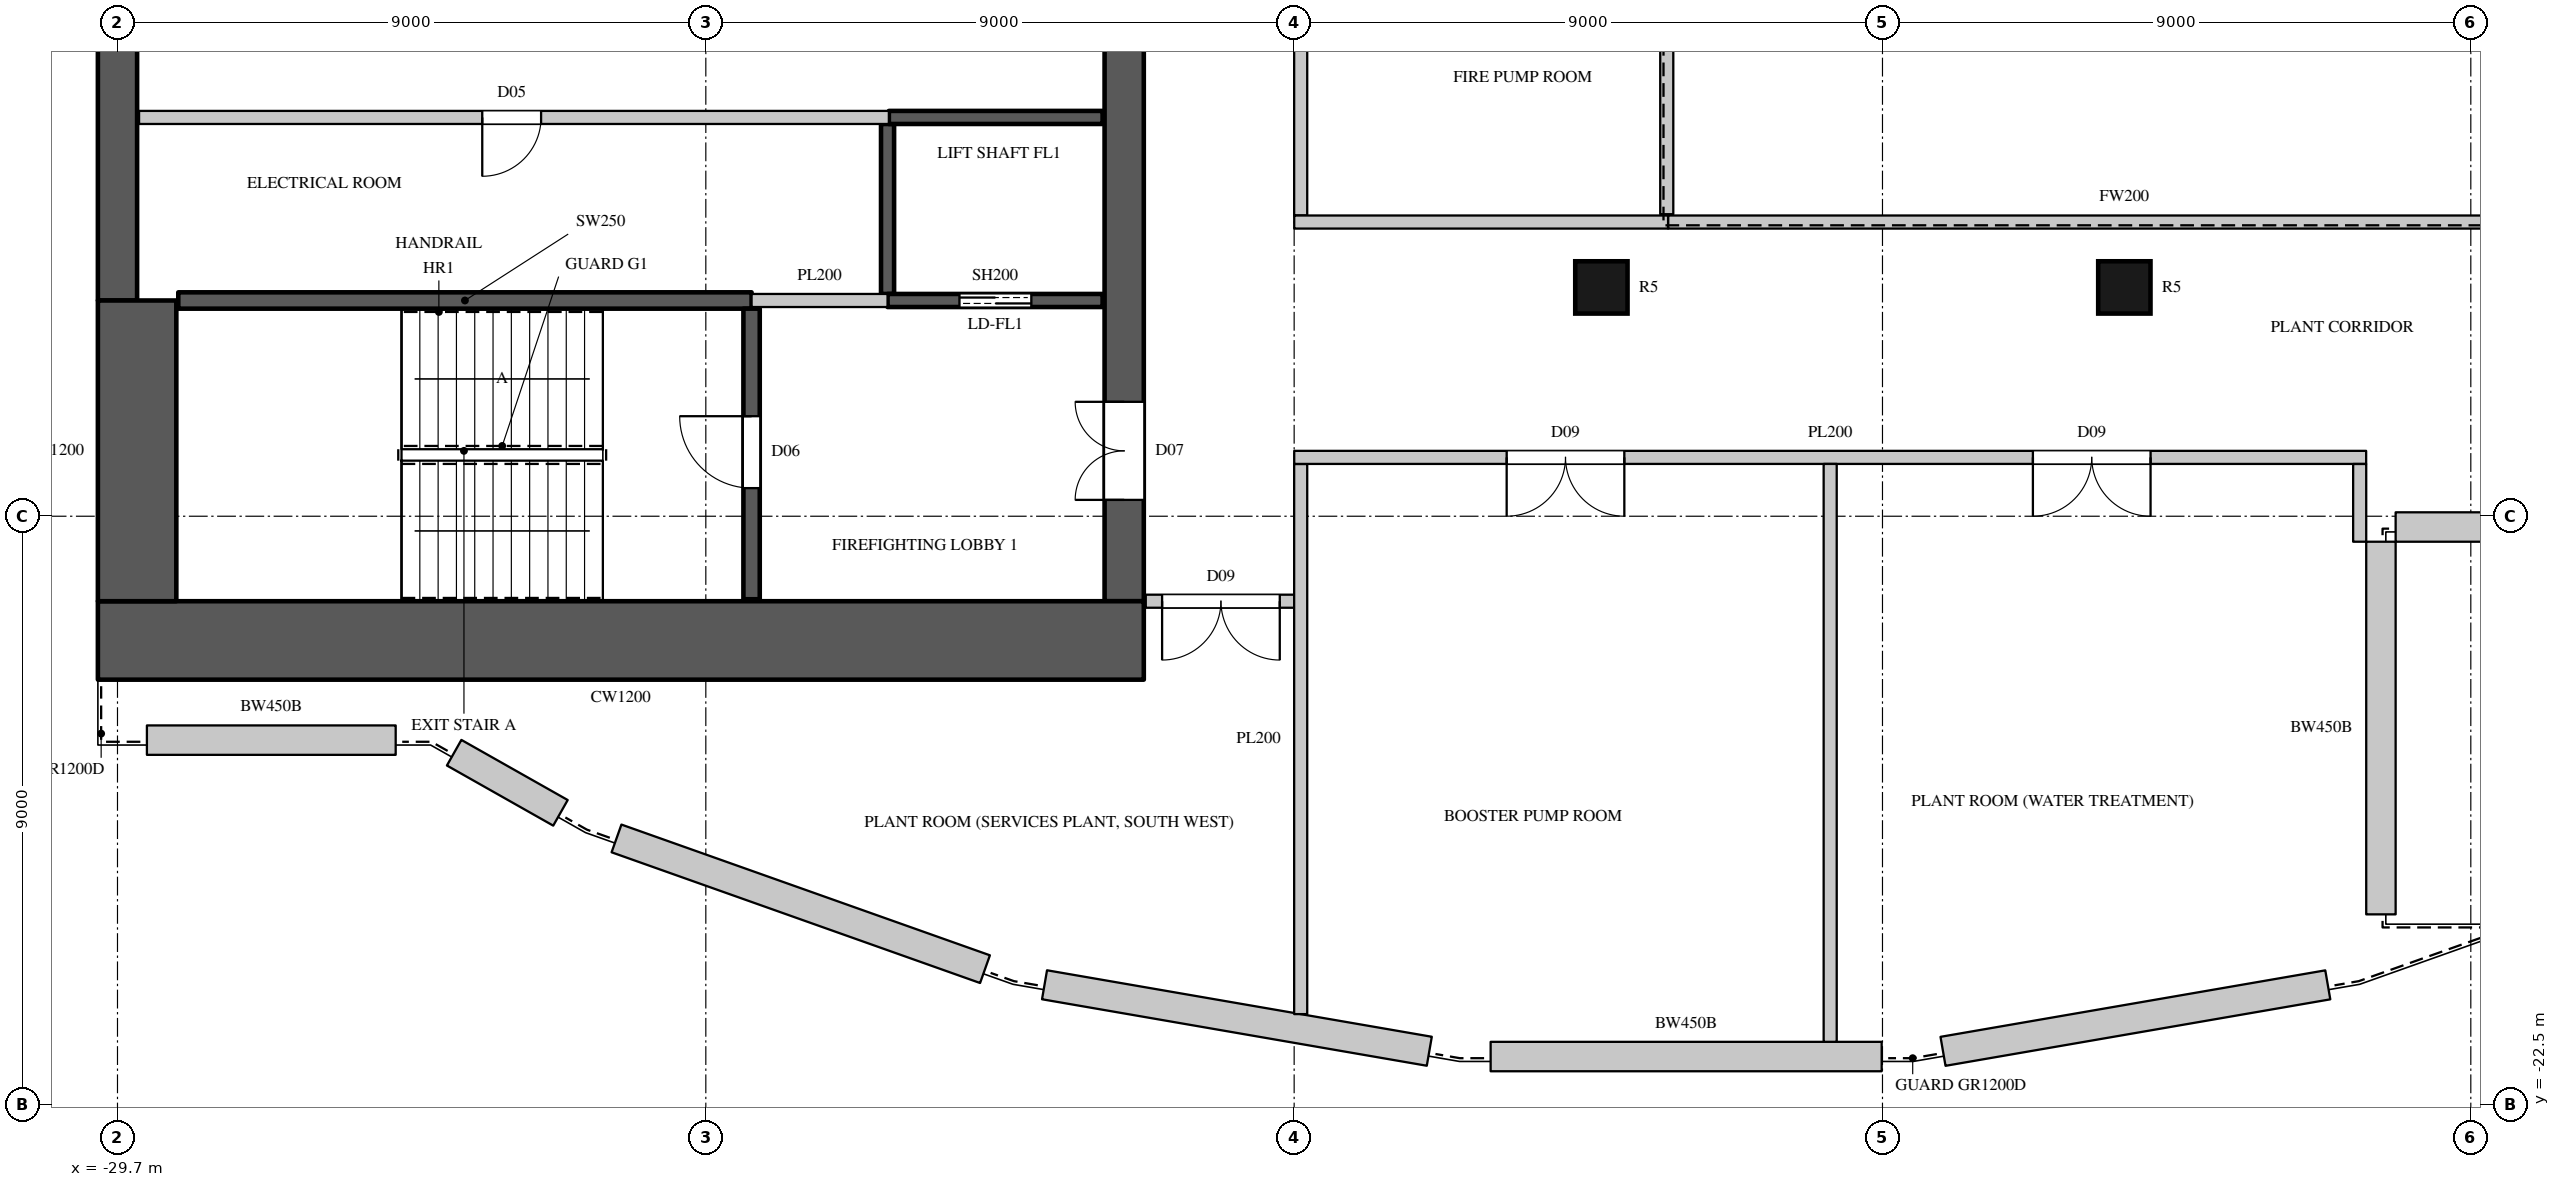
"""IFC4 building model, lengths in metres.
Left out: names, types, materials, properties, quantities, classifications, styles, units other than length and angle.
Written with IfcOpenShell. Run it as: python <this file> out.ifc"""

import sys

from ifc_helpers import new_model, si_unit, direction, frame, frame_2d, origin, origin_2d, place, context, subcontext, project, spatial, rectangle, circle, extrude, element, fill, save


model = new_model("IFC4")
c1 = context("Model", 3, precision=1e-05, world=origin(), true_north=direction((0.0, 1.0)))
c2 = subcontext(c1, "Body", "Model", "MODEL_VIEW")
j1 = project(units=[si_unit("LENGTHUNIT", "METRE"), si_unit("PLANEANGLEUNIT", "RADIAN")], contexts=[c1])
p1 = place(None, origin())
s1 = spatial("IfcSite", under=j1, at=p1, CompositionType="ELEMENT")
p2 = place(p1, origin())
s2 = spatial("IfcBuilding", under=s1, at=p2, CompositionType="ELEMENT")
p3 = place(p2, frame((0.0, 0.0, 347.0)))
s3 = spatial("IfcBuildingStorey", under=s2, at=p3, CompositionType="ELEMENT", Elevation=347.0)
for number, where, z_axis, x_axis in (
    (1, (-7.0, -10.0, 0.0), (0.0, 0.0, 1.0), (1.0, 0.0, 0.0)),
    (2, (1.0, -10.0, 0.0), (0.0, 0.0, 1.0), (1.0, 0.0, 0.0)),
):
    element("IfcColumn", number, at=place(p3, frame(where, z_axis=z_axis, x_axis=x_axis)), inside=s3, PredefinedType="COLUMN", context=c2, shape_type="SweptSolid", body=[
        extrude(circle(Radius=0.4, at=origin_2d()), origin(), (0.0, 0.0, 1.0), 4.0),
    ])
p4 = place(p3, frame((-29.25, -16.925, 0.0), z_axis=(0.0, 0.0, 1.0), x_axis=(1.0, 0.0, 0.0)))
e3 = element("IfcWall", 3, at=p4, inside=s3, PredefinedType="SOLIDWALL", context=c2, shape_type="SweptSolid", body=[
    extrude(rectangle(XDim=3.806, YDim=0.45, at=frame_2d((1.903, 0.0))), origin(), (0.0, 0.0, 1.0), 3.7),
])
p5 = place(p3, frame((-24.55, -17.117, 0.0), z_axis=(0.0, 0.0, 1.0), x_axis=(0.8704776513, -0.492207942427, 0.0)))
e4 = element("IfcWall", 4, at=p5, inside=s3, PredefinedType="SOLIDWALL", context=c2, shape_type="SweptSolid", body=[
    extrude(rectangle(XDim=1.868, YDim=0.45, at=frame_2d((0.934, 0.0))), origin(), (0.0, 0.0, 1.0), 3.7),
])
p6 = place(p3, frame((-22.066, -18.428, 0.0), z_axis=(0.0, 0.0, 1.0), x_axis=(0.942451811453, -0.334342015142, 0.0)))
e5 = element("IfcWall", 5, at=p6, inside=s3, PredefinedType="SOLIDWALL", context=c2, shape_type="SweptSolid", body=[
    extrude(rectangle(XDim=5.981, YDim=0.45, at=frame_2d((2.991, 0.0))), origin(), (0.0, 0.0, 1.0), 3.7),
])
p7 = place(p3, frame((-15.519, -20.667, 0.0), z_axis=(0.0, 0.0, 1.0), x_axis=(0.985396567064, -0.170275088074, 0.0)))
e6 = element("IfcWall", 6, at=p7, inside=s3, PredefinedType="SOLIDWALL", context=c2, shape_type="SweptSolid", body=[
    extrude(rectangle(XDim=5.973, YDim=0.45, at=frame_2d((2.987, 0.0))), origin(), (0.0, 0.0, 1.0), 3.7),
])
p8 = place(p3, frame((-8.694, -21.765, 0.0), z_axis=(0.0, 0.0, 1.0), x_axis=(1.0, 0.0, 0.0)))
e7 = element("IfcWall", 7, at=p8, inside=s3, PredefinedType="SOLIDWALL", context=c2, shape_type="SweptSolid", body=[
    extrude(rectangle(XDim=5.982, YDim=0.45, at=frame_2d((2.991, 0.0))), origin(), (0.0, 0.0, 1.0), 3.7),
])
p9 = place(p3, frame((-1.774, -21.685, 0.0), z_axis=(0.0, 0.0, 1.0), x_axis=(0.985403424257, 0.170235400142, 0.0)))
e8 = element("IfcWall", 8, at=p9, inside=s3, PredefinedType="SOLIDWALL", context=c2, shape_type="SweptSolid", body=[
    extrude(rectangle(XDim=5.973, YDim=0.45, at=frame_2d((2.987, 0.0))), origin(), (0.0, 0.0, 1.0), 3.7),
])
p10 = place(p3, frame((4.925, -19.59, 0.0), z_axis=(0.0, 0.0, 1.0), x_axis=(0.0, 1.0, 0.0)))
e9 = element("IfcWall", 9, at=p10, inside=s3, PredefinedType="SOLIDWALL", context=c2, shape_type="SweptSolid", body=[
    extrude(rectangle(XDim=5.7, YDim=0.45, at=frame_2d((2.85, 0.0))), origin(), (0.0, 0.0, 1.0), 3.7),
])
p11 = place(p3, frame((5.15, -13.665, 0.0), z_axis=(0.0, 0.0, 1.0), x_axis=(1.0, 0.0, 0.0)))
e10 = element("IfcWall", 10, at=p11, inside=s3, PredefinedType="SOLIDWALL", context=c2, shape_type="SweptSolid", body=[
    extrude(rectangle(XDim=4.1, YDim=0.45, at=frame_2d((2.05, 0.0))), origin(), (0.0, 0.0, 1.0), 3.7),
])
p12 = place(p3, frame((-30.0, -15.4, 0.0), z_axis=(0.0, 0.0, 1.0), x_axis=(1.0, 0.0, 0.0)))
e11 = element("IfcWall", 11, at=p12, inside=s3, PredefinedType="SHEAR", context=c2, shape_type="SweptSolid", body=[
    extrude(rectangle(XDim=16.0, YDim=1.2, at=frame_2d((8.0, 0.0))), origin(), (0.0, 0.0, 1.0), 4.0),
])
p13 = place(p3, frame((-14.3, -14.8, 0.0), z_axis=(0.0, 0.0, 1.0), x_axis=(0.0, 1.0, 0.0)))
e12 = element("IfcWall", 12, at=p13, inside=s3, PredefinedType="SHEAR", context=c2, shape_type="SweptSolid", body=[
    extrude(rectangle(XDim=29.6, YDim=0.6, at=frame_2d((14.8, 0.0))), origin(), (0.0, 0.0, 1.0), 4.0),
])
p14 = place(p13, frame((1.55, 0.0, 0.0)))
e13 = element("IfcOpeningElement", 13, at=p14, cuts=e12, PredefinedType="OPENING", context=c2, shape_type="SweptSolid", body=[
    extrude(rectangle(XDim=1.5, YDim=2.4, at=frame_2d((0.75, 1.2))), frame((0.0, 0.31, 0.0), z_axis=(0.0, -1.0, 0.0), x_axis=(1.0, 0.0, 0.0)), (0.0, 0.0, 1.0), 0.62),
])
p15 = place(p13, frame((26.55, 0.0, 0.0)))
e14 = element("IfcOpeningElement", 14, at=p15, cuts=e12, PredefinedType="OPENING", context=c2, shape_type="SweptSolid", body=[
    extrude(rectangle(XDim=1.5, YDim=2.4, at=frame_2d((0.75, 1.2))), frame((0.0, 0.31, 0.0), z_axis=(0.0, -1.0, 0.0), x_axis=(1.0, 0.0, 0.0)), (0.0, 0.0, 1.0), 0.62),
])
p16 = place(p13, frame((8.45, 0.0, 0.0)))
e15 = element("IfcOpeningElement", 15, at=p16, cuts=e12, PredefinedType="OPENING", context=c2, shape_type="SweptSolid", body=[
    extrude(rectangle(XDim=1.5, YDim=2.4, at=frame_2d((0.75, 1.2))), frame((0.0, 0.31, 0.0), z_axis=(0.0, -1.0, 0.0), x_axis=(1.0, 0.0, 0.0)), (0.0, 0.0, 1.0), 0.62),
])
p17 = place(p13, frame((19.65, 0.0, 0.0)))
e16 = element("IfcOpeningElement", 16, at=p17, cuts=e12, PredefinedType="OPENING", context=c2, shape_type="SweptSolid", body=[
    extrude(rectangle(XDim=1.5, YDim=2.4, at=frame_2d((0.75, 1.2))), frame((0.0, 0.31, 0.0), z_axis=(0.0, -1.0, 0.0), x_axis=(1.0, 0.0, 0.0)), (0.0, 0.0, 1.0), 0.62),
])
p18 = place(p13, frame((14.5, 0.0, 0.0)))
e17 = element("IfcOpeningElement", 17, at=p18, cuts=e12, PredefinedType="OPENING", context=c2, shape_type="SweptSolid", body=[
    extrude(rectangle(XDim=0.6, YDim=2.0, at=frame_2d((0.3, 1.0))), frame((0.0, 0.31, 0.0), z_axis=(0.0, -1.0, 0.0), x_axis=(1.0, 0.0, 0.0)), (0.0, 0.0, 1.0), 0.62),
])
p19 = place(p3, frame((-29.7, -10.2, 0.0), z_axis=(0.0, 0.0, 1.0), x_axis=(0.0, 1.0, 0.0)))
e18 = element("IfcWall", 18, at=p19, inside=s3, PredefinedType="SHEAR", context=c2, shape_type="SweptSolid", body=[
    extrude(rectangle(XDim=20.4, YDim=0.6, at=frame_2d((10.2, 0.0))), origin(), (0.0, 0.0, 1.0), 4.0),
])
p20 = place(p3, frame((-29.4, -14.8, 0.0), z_axis=(0.0, 0.0, 1.0), x_axis=(0.0, 1.0, 0.0)))
e19 = element("IfcWall", 19, at=p20, inside=s3, PredefinedType="SHEAR", context=c2, shape_type="SweptSolid", body=[
    extrude(rectangle(XDim=4.6, YDim=1.2, at=frame_2d((2.3, 0.0))), origin(), (0.0, 0.0, 1.0), 4.0),
])
p21 = place(p3, frame((-5.98, -9.0, 0.0), z_axis=(0.0, 0.0, 1.0), x_axis=(1.0, 0.0, 0.0)))
e20 = element("IfcWall", 20, at=p21, inside=s3, PredefinedType="PARTITIONING", context=c2, shape_type="SweptSolid", body=[
    extrude(rectangle(XDim=13.96, YDim=0.2, at=frame_2d((6.98, 0.0))), origin(), (0.0, 0.0, 1.0), 3.598),
])
p22 = place(p3, frame((-29.37, -7.4, 0.0), z_axis=(0.0, 0.0, 1.0), x_axis=(1.0, 0.0, 0.0)))
e21 = element("IfcWall", 21, at=p22, inside=s3, PredefinedType="PARTITIONING", context=c2, shape_type="SweptSolid", body=[
    extrude(rectangle(XDim=11.47, YDim=0.2, at=frame_2d((5.735, 0.0))), origin(), (0.0, 0.0, 1.0), 3.598),
])
p23 = place(p22, frame((5.25, 0.0, 0.0)))
e22 = element("IfcOpeningElement", 22, at=p23, cuts=e21, PredefinedType="OPENING", context=c2, shape_type="SweptSolid", body=[
    extrude(rectangle(XDim=0.9, YDim=2.2, at=frame_2d((0.45, 1.1))), frame((0.0, 0.11, 0.0), z_axis=(0.0, -1.0, 0.0), x_axis=(1.0, 0.0, 0.0)), (0.0, 0.0, 1.0), 0.22),
])
p24 = place(p3, frame((-20.0, -10.2, 0.0), z_axis=(0.0, 0.0, 1.0), x_axis=(1.0, 0.0, 0.0)))
e23 = element("IfcWall", 23, at=p24, inside=s3, PredefinedType="PARTITIONING", context=c2, shape_type="SweptSolid", body=[
    extrude(rectangle(XDim=2.08, YDim=0.2, at=frame_2d((1.04, 0.0))), origin(), (0.0, 0.0, 1.0), 3.598),
])
p25 = place(p3, frame((-13.97, -14.8, 0.0), z_axis=(0.0, 0.0, 1.0), x_axis=(1.0, 0.0, 0.0)))
e24 = element("IfcWall", 24, at=p25, inside=s3, PredefinedType="PARTITIONING", context=c2, shape_type="SweptSolid", body=[
    extrude(rectangle(XDim=2.27, YDim=0.2, at=frame_2d((1.135, 0.0))), origin(), (0.0, 0.0, 1.0), 3.598),
])
p26 = place(p25, frame((0.25, 0.0, 0.0)))
e25 = element("IfcOpeningElement", 25, at=p26, cuts=e24, PredefinedType="OPENING", context=c2, shape_type="SweptSolid", body=[
    extrude(rectangle(XDim=1.8, YDim=2.4, at=frame_2d((0.9, 1.2))), frame((0.0, 0.11, 0.0), z_axis=(0.0, -1.0, 0.0), x_axis=(1.0, 0.0, 0.0)), (0.0, 0.0, 1.0), 0.22),
])
p27 = place(p3, frame((-11.6, -21.116, 0.0), z_axis=(0.0, 0.0, 1.0), x_axis=(0.0, 1.0, 0.0)))
e26 = element("IfcWall", 26, at=p27, inside=s3, PredefinedType="PARTITIONING", context=c2, shape_type="SweptSolid", body=[
    extrude(rectangle(XDim=8.415, YDim=0.2, at=frame_2d((4.208, 0.0))), origin(), (0.0, 0.0, 1.0), 3.598),
])
p28 = place(p3, frame((-11.6, -8.899, 0.0), z_axis=(0.0, 0.0, 1.0), x_axis=(0.0, 1.0, 0.0)))
e27 = element("IfcWall", 27, at=p28, inside=s3, PredefinedType="PARTITIONING", context=c2, shape_type="SweptSolid", body=[
    extrude(rectangle(XDim=17.798, YDim=0.2, at=frame_2d((8.899, 0.0))), origin(), (0.0, 0.0, 1.0), 3.598),
])
p29 = place(p28, frame((3.6, 0.0, 0.0)))
e28 = element("IfcOpeningElement", 28, at=p29, cuts=e27, PredefinedType="OPENING", context=c2, shape_type="SweptSolid", body=[
    extrude(rectangle(XDim=1.8, YDim=2.4, at=frame_2d((0.9, 1.2))), frame((0.0, 0.11, 0.0), z_axis=(0.0, -1.0, 0.0), x_axis=(1.0, 0.0, 0.0)), (0.0, 0.0, 1.0), 0.22),
])
p30 = place(p28, frame((12.35, 0.0, 0.0)))
e29 = element("IfcOpeningElement", 29, at=p30, cuts=e27, PredefinedType="OPENING", context=c2, shape_type="SweptSolid", body=[
    extrude(rectangle(XDim=1.8, YDim=2.4, at=frame_2d((0.9, 1.2))), frame((0.0, 0.11, 0.0), z_axis=(0.0, -1.0, 0.0), x_axis=(1.0, 0.0, 0.0)), (0.0, 0.0, 1.0), 0.22),
])
p31 = place(p3, frame((-11.699, -12.6, 0.0), z_axis=(0.0, 0.0, 1.0), x_axis=(1.0, 0.0, 0.0)))
e30 = element("IfcWall", 30, at=p31, inside=s3, PredefinedType="PARTITIONING", context=c2, shape_type="SweptSolid", body=[
    extrude(rectangle(XDim=16.398, YDim=0.2, at=frame_2d((8.199, 0.0))), origin(), (0.0, 0.0, 1.0), 3.598),
])
p32 = place(p31, frame((3.25, 0.0, 0.0)))
e31 = element("IfcOpeningElement", 31, at=p32, cuts=e30, PredefinedType="OPENING", context=c2, shape_type="SweptSolid", body=[
    extrude(rectangle(XDim=1.8, YDim=2.4, at=frame_2d((0.9, 1.2))), frame((0.0, 0.11, 0.0), z_axis=(0.0, -1.0, 0.0), x_axis=(1.0, 0.0, 0.0)), (0.0, 0.0, 1.0), 0.22),
])
p33 = place(p31, frame((11.3, 0.0, 0.0)))
e32 = element("IfcOpeningElement", 32, at=p33, cuts=e30, PredefinedType="OPENING", context=c2, shape_type="SweptSolid", body=[
    extrude(rectangle(XDim=1.8, YDim=2.4, at=frame_2d((0.9, 1.2))), frame((0.0, 0.11, 0.0), z_axis=(0.0, -1.0, 0.0), x_axis=(1.0, 0.0, 0.0)), (0.0, 0.0, 1.0), 0.22),
])
p34 = place(p3, frame((-11.699, -9.0, 0.0), z_axis=(0.0, 0.0, 1.0), x_axis=(1.0, 0.0, 0.0)))
e33 = element("IfcWall", 33, at=p34, inside=s3, PredefinedType="PARTITIONING", context=c2, shape_type="SweptSolid", body=[
    extrude(rectangle(XDim=5.719, YDim=0.2, at=frame_2d((2.859, 0.0))), origin(), (0.0, 0.0, 1.0), 3.598),
])
p35 = place(p3, frame((-6.0, -8.88, 0.0), z_axis=(0.0, 0.0, 1.0), x_axis=(0.0, 1.0, 0.0)))
e34 = element("IfcWall", 34, at=p35, inside=s3, PredefinedType="PARTITIONING", context=c2, shape_type="SweptSolid", body=[
    extrude(rectangle(XDim=8.88, YDim=0.2, at=frame_2d((4.44, 0.0))), origin(), (0.0, 0.0, 1.0), 3.598),
])
p36 = place(p3, frame((-3.5, -21.54, 0.0), z_axis=(0.0, 0.0, 1.0), x_axis=(0.0, 1.0, 0.0)))
e35 = element("IfcWall", 35, at=p36, inside=s3, PredefinedType="PARTITIONING", context=c2, shape_type="SweptSolid", body=[
    extrude(rectangle(XDim=8.84, YDim=0.2, at=frame_2d((4.42, 0.0))), origin(), (0.0, 0.0, 1.0), 3.598),
])
p37 = place(p3, frame((4.6, -13.89, 0.0), z_axis=(0.0, 0.0, 1.0), x_axis=(0.0, 1.0, 0.0)))
e36 = element("IfcWall", 36, at=p37, inside=s3, PredefinedType="PARTITIONING", context=c2, shape_type="SweptSolid", body=[
    extrude(rectangle(XDim=1.189, YDim=0.2, at=frame_2d((0.594, 0.0))), origin(), (0.0, 0.0, 1.0), 3.598),
])
p38 = place(p3, frame((-17.92, -10.1, 0.0), z_axis=(0.0, 0.0, 1.0), x_axis=(0.0, 1.0, 0.0)))
e37 = element("IfcWall", 37, at=p38, inside=s3, PredefinedType="SHEAR", context=c2, shape_type="SweptSolid", body=[
    extrude(rectangle(XDim=2.6, YDim=0.2, at=frame_2d((1.3, 0.0))), origin(), (0.0, 0.0, 1.0), 3.598),
])
p39 = place(p3, frame((-17.92, -10.2, 0.0), z_axis=(0.0, 0.0, 1.0), x_axis=(1.0, 0.0, 0.0)))
e38 = element("IfcWall", 38, at=p39, inside=s3, PredefinedType="SHEAR", context=c2, shape_type="SweptSolid", body=[
    extrude(rectangle(XDim=3.29, YDim=0.2, at=frame_2d((1.645, 0.0))), origin(), (0.0, 0.0, 1.0), 3.598),
])
p40 = place(p39, frame((1.1, 0.0, 0.0)))
e39 = element("IfcOpeningElement", 39, at=p40, cuts=e38, PredefinedType="OPENING", context=c2, shape_type="SweptSolid", body=[
    extrude(rectangle(XDim=1.1, YDim=2.2, at=frame_2d((0.55, 1.1))), frame((0.0, 0.11, 0.0), z_axis=(0.0, -1.0, 0.0), x_axis=(1.0, 0.0, 0.0)), (0.0, 0.0, 1.0), 0.22),
])
p41 = place(p3, frame((-17.9, -7.4, 0.0), z_axis=(0.0, 0.0, 1.0), x_axis=(1.0, 0.0, 0.0)))
e40 = element("IfcWall", 40, at=p41, inside=s3, PredefinedType="SHEAR", context=c2, shape_type="SweptSolid", body=[
    extrude(rectangle(XDim=3.27, YDim=0.2, at=frame_2d((1.635, 0.0))), origin(), (0.0, 0.0, 1.0), 3.598),
])
p42 = place(p3, frame((-28.77, -10.2, 0.0), z_axis=(0.0, 0.0, 1.0), x_axis=(1.0, 0.0, 0.0)))
e41 = element("IfcWall", 41, at=p42, inside=s3, PredefinedType="SHEAR", context=c2, shape_type="SweptSolid", body=[
    extrude(rectangle(XDim=8.77, YDim=0.25, at=frame_2d((4.385, 0.0))), origin(), (0.0, 0.0, 1.0), 3.598),
])
p43 = place(p3, frame((-20.0, -14.77, 0.0), z_axis=(0.0, 0.0, 1.0), x_axis=(0.0, 1.0, 0.0)))
e42 = element("IfcWall", 42, at=p43, inside=s3, PredefinedType="SHEAR", context=c2, shape_type="SweptSolid", body=[
    extrude(rectangle(XDim=4.445, YDim=0.25, at=frame_2d((2.223, 0.0))), origin(), (0.0, 0.0, 1.0), 3.598),
])
p44 = place(p43, frame((1.7, 0.0, 0.0)))
e43 = element("IfcOpeningElement", 43, at=p44, cuts=e42, PredefinedType="OPENING", context=c2, shape_type="SweptSolid", body=[
    extrude(rectangle(XDim=1.1, YDim=2.2, at=frame_2d((0.55, 1.1))), frame((0.0, 0.135, 0.0), z_axis=(0.0, -1.0, 0.0), x_axis=(1.0, 0.0, 0.0)), (0.0, 0.0, 1.0), 0.27),
])
p45 = place(p44, origin())
e44 = element("IfcDoor", 44, at=p45, inside=s3, OperationType="SINGLE_SWING_RIGHT", PredefinedType="DOOR", context=c2, shape_type="SweptSolid", body=[
    extrude(rectangle(XDim=1.1, YDim=2.2, at=frame_2d((0.55, 1.1))), frame((0.0, 0.025, 0.0), z_axis=(0.0, -1.0, 0.0), x_axis=(1.0, 0.0, 0.0)), (0.0, 0.0, 1.0), 0.05),
])
fill(e43, e44)
p46 = place(p23, origin())
e45 = element("IfcDoor", 45, at=p46, inside=s3, OperationType="SINGLE_SWING_RIGHT", PredefinedType="DOOR", context=c2, shape_type="SweptSolid", body=[
    extrude(rectangle(XDim=0.9, YDim=2.2, at=frame_2d((0.45, 1.1))), frame((0.0, 0.025, 0.0), z_axis=(0.0, -1.0, 0.0), x_axis=(1.0, 0.0, 0.0)), (0.0, 0.0, 1.0), 0.05),
])
fill(e22, e45)
p47 = place(p40, origin())
e46 = element("IfcDoor", 46, at=p47, inside=s3, OperationType="DOUBLE_DOOR_SLIDING", PredefinedType="DOOR", context=c2, shape_type="SweptSolid", body=[
    extrude(rectangle(XDim=1.1, YDim=2.2, at=frame_2d((0.55, 1.1))), frame((0.0, 0.025, 0.0), z_axis=(0.0, -1.0, 0.0), x_axis=(1.0, 0.0, 0.0)), (0.0, 0.0, 1.0), 0.05),
])
fill(e39, e46)
p48 = place(p32, origin())
e47 = element("IfcDoor", 47, at=p48, inside=s3, OperationType="DOUBLE_DOOR_SINGLE_SWING", PredefinedType="DOOR", context=c2, shape_type="SweptSolid", body=[
    extrude(rectangle(XDim=1.8, YDim=2.4, at=frame_2d((0.9, 1.2))), frame((0.0, 0.025, 0.0), z_axis=(0.0, -1.0, 0.0), x_axis=(1.0, 0.0, 0.0)), (0.0, 0.0, 1.0), 0.05),
])
fill(e31, e47)
p49 = place(p33, origin())
e48 = element("IfcDoor", 48, at=p49, inside=s3, OperationType="DOUBLE_DOOR_SINGLE_SWING", PredefinedType="DOOR", context=c2, shape_type="SweptSolid", body=[
    extrude(rectangle(XDim=1.8, YDim=2.4, at=frame_2d((0.9, 1.2))), frame((0.0, 0.025, 0.0), z_axis=(0.0, -1.0, 0.0), x_axis=(1.0, 0.0, 0.0)), (0.0, 0.0, 1.0), 0.05),
])
fill(e32, e48)
p50 = place(p26, origin())
e49 = element("IfcDoor", 49, at=p50, inside=s3, OperationType="DOUBLE_DOOR_SINGLE_SWING", PredefinedType="DOOR", context=c2, shape_type="SweptSolid", body=[
    extrude(rectangle(XDim=1.8, YDim=2.4, at=frame_2d((0.9, 1.2))), frame((0.0, 0.025, 0.0), z_axis=(0.0, -1.0, 0.0), x_axis=(1.0, 0.0, 0.0)), (0.0, 0.0, 1.0), 0.05),
])
fill(e25, e49)
p51 = place(p14, origin())
e50 = element("IfcDoor", 50, at=p51, inside=s3, OperationType="DOUBLE_DOOR_SINGLE_SWING", PredefinedType="DOOR", context=c2, shape_type="SweptSolid", body=[
    extrude(rectangle(XDim=1.5, YDim=2.4, at=frame_2d((0.75, 1.2))), frame((0.0, 0.295, 0.0), z_axis=(0.0, -1.0, 0.0), x_axis=(1.0, 0.0, 0.0)), (0.0, 0.0, 1.0), 0.05),
])
fill(e13, e50)
save(model, sys.argv[1])
